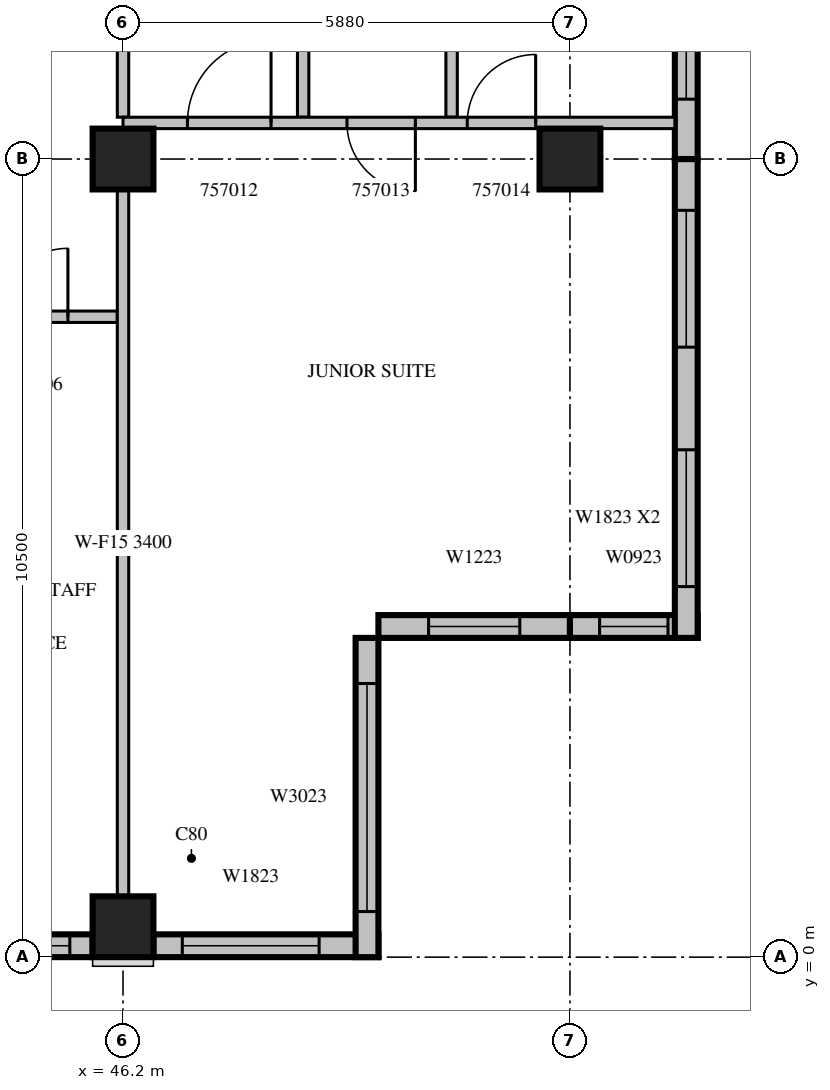
"""IFC4 building model, lengths in metres.
Left out: names, types, materials, properties, quantities, classifications, styles, units other than length and angle.
Written with IfcOpenShell. Run it as: python <this file> out.ifc"""

import sys

from ifc_helpers import new_model, si_unit, direction, frame, frame_2d, origin, origin_2d, place, context, subcontext, project, spatial, rectangle, extrude, source, transform, mapped, element, fill, save


model = new_model("IFC4")
c1 = context("Model", 3, precision=1e-05, world=origin(), true_north=direction((0.0, 1.0)))
c2 = subcontext(c1, "Body", "Model", "MODEL_VIEW")
j1 = project(units=[si_unit("LENGTHUNIT", "METRE"), si_unit("PLANEANGLEUNIT", "RADIAN")], contexts=[c1])
p1 = place(None, origin())
s1 = spatial("IfcSite", under=j1, at=p1, CompositionType="ELEMENT")
p2 = place(p1, origin())
s2 = spatial("IfcBuilding", under=s1, at=p2, CompositionType="ELEMENT")
p3 = place(p2, frame((0.0, 0.0, 250.0)))
s3 = spatial("IfcBuildingStorey", under=s2, at=p3, CompositionType="ELEMENT", Elevation=250.0)
m1 = source(origin(), c2, "Body", "SweptSolid", [
    extrude(rectangle(XDim=0.8, YDim=0.8, at=origin_2d()), origin(), (0.0, 0.0, 1.0), 3.8),
])
for number, where, z_axis, x_axis in (
    (1, (46.2, 0.4, 0.0), (0.0, 0.0, 1.0), (1.0, 0.0, 0.0)),
    (2, (46.2, 10.5, 0.0), (0.0, 0.0, 1.0), (1.0, 0.0, 0.0)),
    (3, (52.08, 10.5, 0.0), (0.0, 0.0, 1.0), (1.0, 0.0, 0.0)),
):
    element("IfcColumn", number, at=place(p3, frame(where, z_axis=z_axis, x_axis=x_axis)), inside=s3, PredefinedType="COLUMN", context=c2, shape_type="MappedRepresentation", body=[
        mapped(m1, transform((0.0, 0.0, 0.0), scale=1.0)),
    ])
m2 = source(origin(), c2, "Body", "SweptSolid", [
    extrude(rectangle(XDim=1.8, YDim=0.3, at=frame_2d((0.9, 0.0))), origin(), (0.0, 0.0, 1.0), 3.4),
])
p4 = place(p3, frame((44.0, 0.15, 0.0), z_axis=(0.0, 0.0, 1.0), x_axis=(1.0, 0.0, 0.0)))
e4 = element("IfcWall", 4, at=p4, inside=s3, PredefinedType="STANDARD", context=c2, shape_type="MappedRepresentation", body=[
    mapped(m2, transform((0.0, 0.0, 0.0), scale=1.0)),
])
m3 = source(origin(), c2, "Body", "SweptSolid", [
    extrude(rectangle(XDim=1.2, YDim=2.3, at=frame_2d((0.6, 1.15))), frame((0.0, 0.16, 0.0), z_axis=(0.0, -1.0, 0.0), x_axis=(1.0, 0.0, 0.0)), (0.0, 0.0, 1.0), 0.32),
])
p5 = place(p4, frame((0.3, 0.0, 0.6)))
e5 = element("IfcOpeningElement", 5, at=p5, cuts=e4, PredefinedType="OPENING", context=c2, shape_type="MappedRepresentation", body=[
    mapped(m3, transform((0.0, 0.0, 0.0), scale=1.0)),
])
m4 = source(origin(), c2, "Body", "SweptSolid", [
    extrude(rectangle(XDim=2.96, YDim=0.3, at=frame_2d((1.48, 0.0))), origin(), (0.0, 0.0, 1.0), 3.4),
])
p6 = place(p3, frame((46.6, 0.15, 0.0), z_axis=(0.0, 0.0, 1.0), x_axis=(1.0, 0.0, 0.0)))
e6 = element("IfcWall", 6, at=p6, inside=s3, PredefinedType="STANDARD", context=c2, shape_type="MappedRepresentation", body=[
    mapped(m4, transform((0.0, 0.0, 0.0), scale=1.0)),
])
m5 = source(origin(), c2, "Body", "SweptSolid", [
    extrude(rectangle(XDim=1.8, YDim=2.3, at=frame_2d((0.9, 1.15))), frame((0.0, 0.16, 0.0), z_axis=(0.0, -1.0, 0.0), x_axis=(1.0, 0.0, 0.0)), (0.0, 0.0, 1.0), 0.32),
])
p7 = place(p6, frame((0.38, 0.0, 0.6)))
e7 = element("IfcOpeningElement", 7, at=p7, cuts=e6, PredefinedType="OPENING", context=c2, shape_type="MappedRepresentation", body=[
    mapped(m5, transform((0.0, 0.0, 0.0), scale=1.0)),
])
m6 = source(origin(), c2, "Body", "SweptSolid", [
    extrude(rectangle(XDim=4.2, YDim=0.3, at=frame_2d((2.1, 0.0))), origin(), (0.0, 0.0, 1.0), 3.4),
])
p8 = place(p3, frame((49.41, 0.0, 0.0), z_axis=(0.0, 0.0, 1.0), x_axis=(0.0, 1.0, 0.0)))
e8 = element("IfcWall", 8, at=p8, inside=s3, PredefinedType="STANDARD", context=c2, shape_type="MappedRepresentation", body=[
    mapped(m6, transform((0.0, 0.0, 0.0), scale=1.0)),
])
m7 = source(origin(), c2, "Body", "SweptSolid", [
    extrude(rectangle(XDim=3.0, YDim=2.3, at=frame_2d((1.5, 1.15))), frame((0.0, 0.16, 0.0), z_axis=(0.0, -1.0, 0.0), x_axis=(1.0, 0.0, 0.0)), (0.0, 0.0, 1.0), 0.32),
])
p9 = place(p8, frame((0.6, 0.0, 0.6)))
e9 = element("IfcOpeningElement", 9, at=p9, cuts=e8, PredefinedType="OPENING", context=c2, shape_type="MappedRepresentation", body=[
    mapped(m7, transform((0.0, 0.0, 0.0), scale=1.0)),
])
m8 = source(origin(), c2, "Body", "SweptSolid", [
    extrude(rectangle(XDim=2.52, YDim=0.3, at=frame_2d((1.26, 0.0))), origin(), (0.0, 0.0, 1.0), 3.4),
])
p10 = place(p3, frame((49.56, 4.35, 0.0), z_axis=(0.0, 0.0, 1.0), x_axis=(1.0, 0.0, 0.0)))
e10 = element("IfcWall", 10, at=p10, inside=s3, PredefinedType="STANDARD", context=c2, shape_type="MappedRepresentation", body=[
    mapped(m8, transform((0.0, 0.0, 0.0), scale=1.0)),
])
p11 = place(p10, frame((0.66, 0.0, 0.6)))
e11 = element("IfcOpeningElement", 11, at=p11, cuts=e10, PredefinedType="OPENING", context=c2, shape_type="MappedRepresentation", body=[
    mapped(m3, transform((0.0, 0.0, 0.0), scale=1.0)),
])
m9 = source(origin(), c2, "Body", "SweptSolid", [
    extrude(rectangle(XDim=1.68, YDim=0.3, at=frame_2d((0.84, 0.0))), origin(), (0.0, 0.0, 1.0), 3.4),
])
p12 = place(p3, frame((52.08, 4.35, 0.0), z_axis=(0.0, 0.0, 1.0), x_axis=(1.0, 0.0, 0.0)))
e12 = element("IfcWall", 12, at=p12, inside=s3, PredefinedType="STANDARD", context=c2, shape_type="MappedRepresentation", body=[
    mapped(m9, transform((0.0, 0.0, 0.0), scale=1.0)),
])
m10 = source(origin(), c2, "Body", "SweptSolid", [
    extrude(rectangle(XDim=0.9, YDim=2.3, at=frame_2d((0.45, 1.15))), frame((0.0, 0.16, 0.0), z_axis=(0.0, -1.0, 0.0), x_axis=(1.0, 0.0, 0.0)), (0.0, 0.0, 1.0), 0.32),
])
p13 = place(p12, frame((0.39, 0.0, 0.6)))
e13 = element("IfcOpeningElement", 13, at=p13, cuts=e12, PredefinedType="OPENING", context=c2, shape_type="MappedRepresentation", body=[
    mapped(m10, transform((0.0, 0.0, 0.0), scale=1.0)),
])
m11 = source(origin(), c2, "Body", "SweptSolid", [
    extrude(rectangle(XDim=6.3, YDim=0.3, at=frame_2d((3.15, 0.0))), origin(), (0.0, 0.0, 1.0), 3.4),
])
p14 = place(p3, frame((53.61, 4.2, 0.0), z_axis=(0.0, 0.0, 1.0), x_axis=(0.0, 1.0, 0.0)))
e14 = element("IfcWall", 14, at=p14, inside=s3, PredefinedType="STANDARD", context=c2, shape_type="MappedRepresentation", body=[
    mapped(m11, transform((0.0, 0.0, 0.0), scale=1.0)),
])
p15 = place(p14, frame((0.675, 0.0, 0.6)))
e15 = element("IfcOpeningElement", 15, at=p15, cuts=e14, PredefinedType="OPENING", context=c2, shape_type="MappedRepresentation", body=[
    mapped(m5, transform((0.0, 0.0, 0.0), scale=1.0)),
])
p16 = place(p14, frame((3.825, 0.0, 0.6)))
e16 = element("IfcOpeningElement", 16, at=p16, cuts=e14, PredefinedType="OPENING", context=c2, shape_type="MappedRepresentation", body=[
    mapped(m5, transform((0.0, 0.0, 0.0), scale=1.0)),
])
m12 = source(origin(), c2, "Body", "SweptSolid", [
    extrude(rectangle(XDim=3.375, YDim=0.3, at=frame_2d((1.688, 0.0))), origin(), (0.0, 0.0, 1.0), 3.4),
])
p17 = place(p3, frame((53.61, 10.5, 0.0), z_axis=(0.0, 0.0, 1.0), x_axis=(0.0, 1.0, 0.0)))
e17 = element("IfcWall", 17, at=p17, inside=s3, PredefinedType="STANDARD", context=c2, shape_type="MappedRepresentation", body=[
    mapped(m12, transform((0.0, 0.0, 0.0), scale=1.0)),
])
p18 = place(p17, frame((0.787, 0.0, 0.6)))
e18 = element("IfcOpeningElement", 18, at=p18, cuts=e17, PredefinedType="OPENING", context=c2, shape_type="MappedRepresentation", body=[
    mapped(m5, transform((0.0, 0.0, 0.0), scale=1.0)),
])
m13 = source(origin(), c2, "Body", "SweptSolid", [
    extrude(rectangle(XDim=2.2, YDim=0.15, at=frame_2d((1.1, 0.0))), origin(), (0.0, 0.0, 1.0), 3.4),
])
p19 = place(p3, frame((46.125, 8.425, 0.0), z_axis=(0.0, 0.0, 1.0), x_axis=(-1.0, 0.0, 0.0)))
e19 = element("IfcWall", 19, at=p19, inside=s3, PredefinedType="PARTITIONING", context=c2, shape_type="MappedRepresentation", body=[
    mapped(m13, transform((0.0, 0.0, 0.0), scale=1.0)),
])
m14 = source(origin(), c2, "Body", "SweptSolid", [
    extrude(rectangle(XDim=0.9, YDim=2.1, at=frame_2d((0.45, 1.05))), frame((0.0, 0.085, 0.0), z_axis=(0.0, -1.0, 0.0), x_axis=(1.0, 0.0, 0.0)), (0.0, 0.0, 1.0), 0.17),
])
p20 = place(p19, frame((0.65, 0.0, 0.0)))
e20 = element("IfcOpeningElement", 20, at=p20, cuts=e19, PredefinedType="OPENING", context=c2, shape_type="MappedRepresentation", body=[
    mapped(m14, transform((0.0, 0.0, 0.0), scale=1.0)),
])
m15 = source(origin(), c2, "Body", "SweptSolid", [
    extrude(rectangle(XDim=3.95, YDim=0.15, at=frame_2d((1.975, 0.0))), origin(), (0.0, 0.0, 1.0), 3.4),
])
for number, where, z_axis, x_axis in (
    (21, (48.57, 11.05, 0.0), (0.0, 0.0, 1.0), (0.0, 1.0, 0.0)),
    (22, (50.523, 11.05, 0.0), (0.0, 0.0, 1.0), (0.0, 1.0, 0.0)),
):
    element("IfcWall", number, at=place(p3, frame(where, z_axis=z_axis, x_axis=x_axis)), inside=s3, PredefinedType="PARTITIONING", context=c2, shape_type="MappedRepresentation", body=[
        mapped(m15, transform((0.0, 0.0, 0.0), scale=1.0)),
    ])
m16 = source(origin(), c2, "Body", "SweptSolid", [
    extrude(rectangle(XDim=9.302, YDim=0.15, at=frame_2d((4.651, 0.0))), origin(), (0.0, 0.0, 1.0), 3.4),
])
p21 = place(p3, frame((46.2, 0.799, 0.0), z_axis=(0.0, 0.0, 1.0), x_axis=(0.0, 1.0, 0.0)))
e23 = element("IfcWall", 23, at=p21, inside=s3, PredefinedType="PARTITIONING", context=c2, shape_type="MappedRepresentation", body=[
    mapped(m16, transform((0.0, 0.0, 0.0), scale=1.0)),
])
p22 = place(p3, frame((46.2, 11.05, 0.0), z_axis=(0.0, 0.0, 1.0), x_axis=(0.0, 1.0, 0.0)))
e24 = element("IfcWall", 24, at=p22, inside=s3, PredefinedType="PARTITIONING", context=c2, shape_type="MappedRepresentation", body=[
    mapped(m15, transform((0.0, 0.0, 0.0), scale=1.0)),
])
m17 = source(origin(), c2, "Body", "SweptSolid", [
    extrude(rectangle(XDim=7.26, YDim=0.15, at=frame_2d((3.63, 0.0))), origin(), (0.0, 0.0, 1.0), 3.4),
])
p23 = place(p3, frame((53.46, 10.975, 0.0), z_axis=(0.0, 0.0, 1.0), x_axis=(-1.0, 0.0, 0.0)))
e25 = element("IfcWall", 25, at=p23, inside=s3, PredefinedType="PARTITIONING", context=c2, shape_type="MappedRepresentation", body=[
    mapped(m17, transform((0.0, 0.0, 0.0), scale=1.0)),
])
m18 = source(origin(), c2, "Body", "SweptSolid", [
    extrude(rectangle(XDim=1.1, YDim=2.1, at=frame_2d((0.55, 1.05))), frame((0.0, 0.085, 0.0), z_axis=(0.0, -1.0, 0.0), x_axis=(1.0, 0.0, 0.0)), (0.0, 0.0, 1.0), 0.17),
])
p24 = place(p23, frame((5.313, 0.0, 0.0)))
e26 = element("IfcOpeningElement", 26, at=p24, cuts=e25, PredefinedType="OPENING", context=c2, shape_type="MappedRepresentation", body=[
    mapped(m18, transform((0.0, 0.0, 0.0), scale=1.0)),
])
p25 = place(p23, frame((3.414, 0.0, 0.0)))
e27 = element("IfcOpeningElement", 27, at=p25, cuts=e25, PredefinedType="OPENING", context=c2, shape_type="MappedRepresentation", body=[
    mapped(m14, transform((0.0, 0.0, 0.0), scale=1.0)),
])
p26 = place(p23, frame((1.831, 0.0, 0.0)))
e28 = element("IfcOpeningElement", 28, at=p26, cuts=e25, PredefinedType="OPENING", context=c2, shape_type="MappedRepresentation", body=[
    mapped(m14, transform((0.0, 0.0, 0.0), scale=1.0)),
])
m19 = source(origin(), c2, "Body", "SweptSolid", [
    extrude(rectangle(XDim=1.2, YDim=2.3, at=frame_2d((0.6, 1.15))), frame((0.0, 0.03, 0.0), z_axis=(0.0, -1.0, 0.0), x_axis=(1.0, 0.0, 0.0)), (0.0, 0.0, 1.0), 0.06),
])
p27 = place(p5, origin())
e29 = element("IfcWindow", 29, at=p27, inside=s3, PartitioningType="SINGLE_PANEL", PredefinedType="WINDOW", context=c2, shape_type="MappedRepresentation", body=[
    mapped(m19, transform((0.0, 0.0, 0.0), scale=1.0)),
])
fill(e5, e29)
m20 = source(origin(), c2, "Body", "SweptSolid", [
    extrude(rectangle(XDim=1.8, YDim=2.3, at=frame_2d((0.9, 1.15))), frame((0.0, 0.03, 0.0), z_axis=(0.0, -1.0, 0.0), x_axis=(1.0, 0.0, 0.0)), (0.0, 0.0, 1.0), 0.06),
])
p28 = place(p7, origin())
e30 = element("IfcWindow", 30, at=p28, inside=s3, PartitioningType="SINGLE_PANEL", PredefinedType="WINDOW", context=c2, shape_type="MappedRepresentation", body=[
    mapped(m20, transform((0.0, 0.0, 0.0), scale=1.0)),
])
fill(e7, e30)
m21 = source(origin(), c2, "Body", "SweptSolid", [
    extrude(rectangle(XDim=3.0, YDim=2.3, at=frame_2d((1.5, 1.15))), frame((0.0, 0.03, 0.0), z_axis=(0.0, -1.0, 0.0), x_axis=(1.0, 0.0, 0.0)), (0.0, 0.0, 1.0), 0.06),
])
p29 = place(p9, origin())
e31 = element("IfcWindow", 31, at=p29, inside=s3, PartitioningType="SINGLE_PANEL", PredefinedType="WINDOW", context=c2, shape_type="MappedRepresentation", body=[
    mapped(m21, transform((0.0, 0.0, 0.0), scale=1.0)),
])
fill(e9, e31)
p30 = place(p11, origin())
e32 = element("IfcWindow", 32, at=p30, inside=s3, PartitioningType="SINGLE_PANEL", PredefinedType="WINDOW", context=c2, shape_type="MappedRepresentation", body=[
    mapped(m19, transform((0.0, 0.0, 0.0), scale=1.0)),
])
fill(e11, e32)
m22 = source(origin(), c2, "Body", "SweptSolid", [
    extrude(rectangle(XDim=0.9, YDim=2.3, at=frame_2d((0.45, 1.15))), frame((0.0, 0.03, 0.0), z_axis=(0.0, -1.0, 0.0), x_axis=(1.0, 0.0, 0.0)), (0.0, 0.0, 1.0), 0.06),
])
p31 = place(p13, origin())
e33 = element("IfcWindow", 33, at=p31, inside=s3, PartitioningType="SINGLE_PANEL", PredefinedType="WINDOW", context=c2, shape_type="MappedRepresentation", body=[
    mapped(m22, transform((0.0, 0.0, 0.0), scale=1.0)),
])
fill(e13, e33)
p32 = place(p15, origin())
e34 = element("IfcWindow", 34, at=p32, inside=s3, PartitioningType="SINGLE_PANEL", PredefinedType="WINDOW", context=c2, shape_type="MappedRepresentation", body=[
    mapped(m20, transform((0.0, 0.0, 0.0), scale=1.0)),
])
fill(e15, e34)
p33 = place(p16, origin())
e35 = element("IfcWindow", 35, at=p33, inside=s3, PartitioningType="SINGLE_PANEL", PredefinedType="WINDOW", context=c2, shape_type="MappedRepresentation", body=[
    mapped(m20, transform((0.0, 0.0, 0.0), scale=1.0)),
])
fill(e16, e35)
p34 = place(p18, origin())
e36 = element("IfcWindow", 36, at=p34, inside=s3, PartitioningType="SINGLE_PANEL", PredefinedType="WINDOW", context=c2, shape_type="MappedRepresentation", body=[
    mapped(m20, transform((0.0, 0.0, 0.0), scale=1.0)),
])
fill(e18, e36)
m23 = source(origin(), c2, "Body", "SweptSolid", [
    extrude(rectangle(XDim=0.9, YDim=2.1, at=frame_2d((0.45, 1.05))), frame((0.0, 0.025, 0.0), z_axis=(0.0, -1.0, 0.0), x_axis=(1.0, 0.0, 0.0)), (0.0, 0.0, 1.0), 0.05),
])
p35 = place(p20, origin())
e37 = element("IfcDoor", 37, at=p35, inside=s3, OperationType="SINGLE_SWING_RIGHT", PredefinedType="DOOR", context=c2, shape_type="MappedRepresentation", body=[
    mapped(m23, transform((0.0, 0.0, 0.0), scale=1.0)),
])
fill(e20, e37)
m24 = source(origin(), c2, "Body", "SweptSolid", [
    extrude(rectangle(XDim=1.1, YDim=2.1, at=frame_2d((0.55, 1.05))), frame((0.0, 0.025, 0.0), z_axis=(0.0, -1.0, 0.0), x_axis=(1.0, 0.0, 0.0)), (0.0, 0.0, 1.0), 0.05),
])
p36 = place(p24, origin())
e38 = element("IfcDoor", 38, at=p36, inside=s3, OperationType="SINGLE_SWING_RIGHT", PredefinedType="DOOR", context=c2, shape_type="MappedRepresentation", body=[
    mapped(m24, transform((0.0, 0.0, 0.0), scale=1.0)),
])
fill(e26, e38)
p37 = place(p25, origin())
e39 = element("IfcDoor", 39, at=p37, inside=s3, OperationType="SINGLE_SWING_LEFT", PredefinedType="DOOR", context=c2, shape_type="MappedRepresentation", body=[
    mapped(m23, transform((0.0, 0.0, 0.0), scale=1.0)),
])
fill(e27, e39)
p38 = place(p26, origin())
e40 = element("IfcDoor", 40, at=p38, inside=s3, OperationType="SINGLE_SWING_RIGHT", PredefinedType="DOOR", context=c2, shape_type="MappedRepresentation", body=[
    mapped(m23, transform((0.0, 0.0, 0.0), scale=1.0)),
])
fill(e28, e40)
save(model, sys.argv[1])
